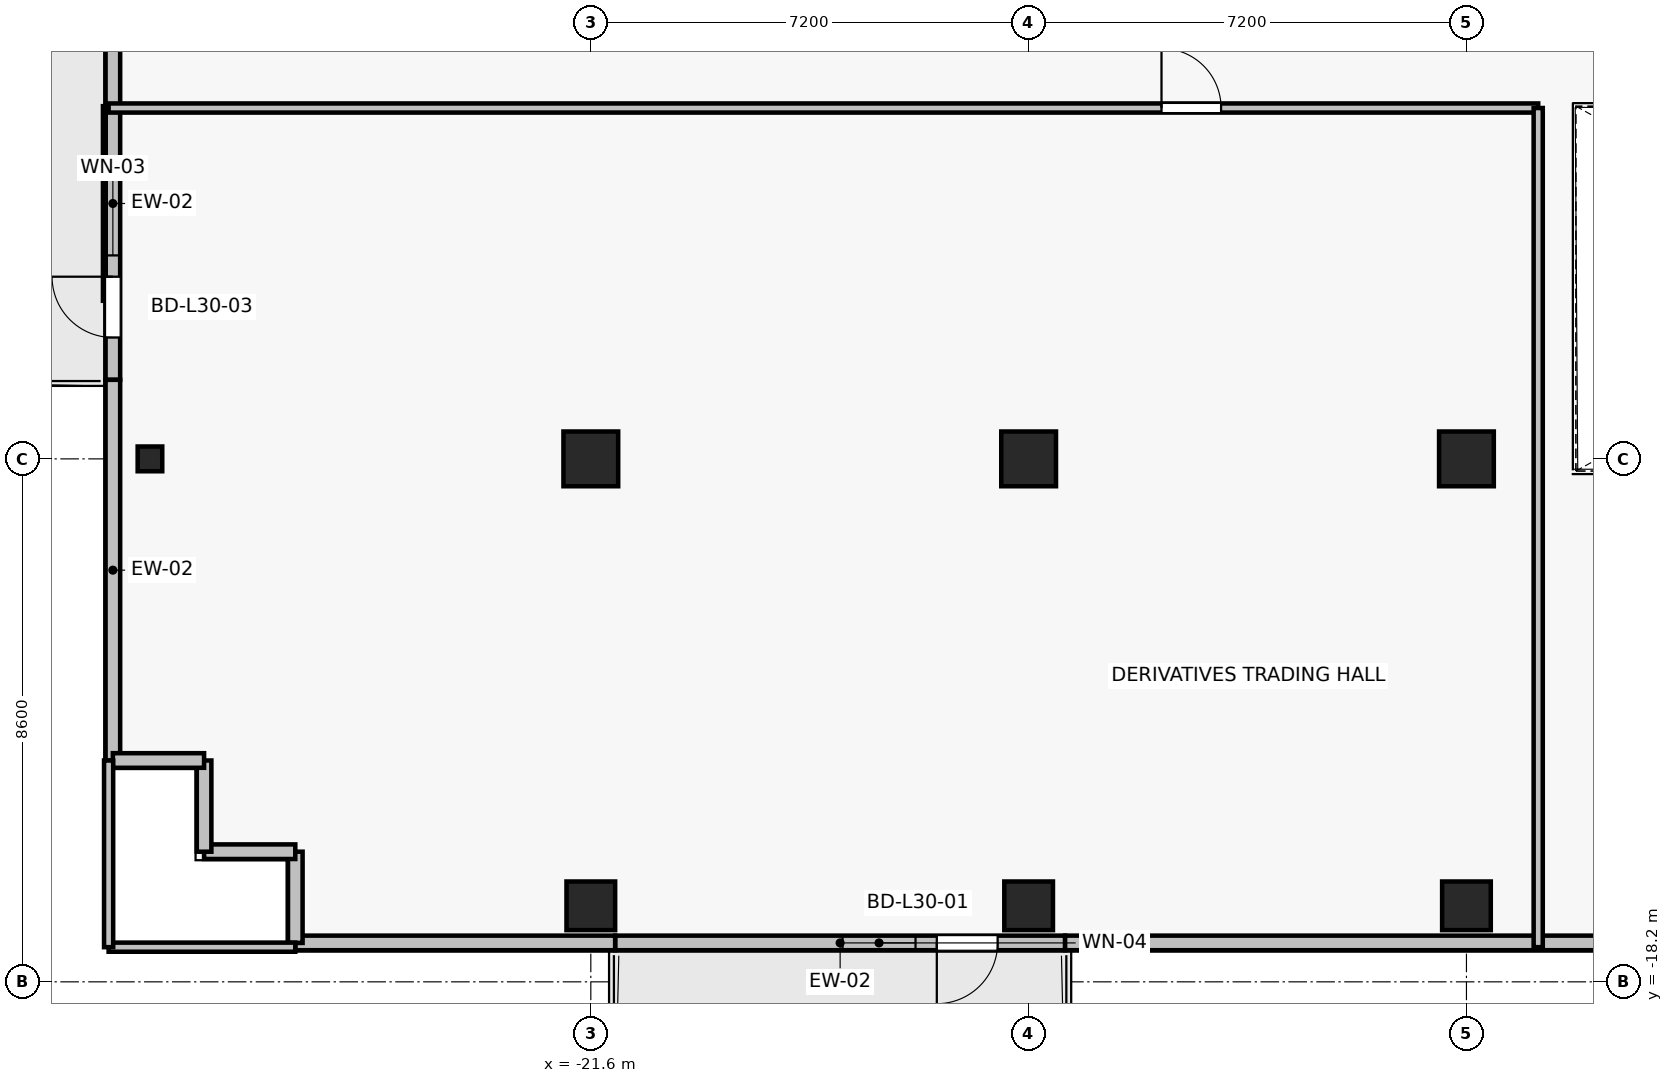
"""IFC4 building model, lengths in metres.
Left out: names, types, materials, properties, quantities, classifications, styles, units other than length and angle.
Written with IfcOpenShell. Run it as: python <this file> out.ifc"""

import sys

from ifc_helpers import new_model, si_unit, direction, frame, frame_2d, origin, origin_2d, place, context, subcontext, project, spatial, rectangle, i_section, extrude, source, transform, mapped, element, fill, save


model = new_model("IFC4")
c1 = context("Model", 3, precision=1e-05, world=origin(), true_north=direction((0.0, 1.0)))
c2 = subcontext(c1, "Body", "Model", "MODEL_VIEW")
j1 = project(units=[si_unit("LENGTHUNIT", "METRE"), si_unit("PLANEANGLEUNIT", "RADIAN")], contexts=[c1])
p1 = place(None, origin())
s1 = spatial("IfcSite", under=j1, at=p1, CompositionType="ELEMENT")
p2 = place(p1, origin())
s2 = spatial("IfcBuilding", under=s1, at=p2, CompositionType="ELEMENT")
p3 = place(p2, frame((0.0, 0.0, 109.9)))
s3 = spatial("IfcBuildingStorey", under=s2, at=p3, CompositionType="ELEMENT", Elevation=109.9)
for number, where, z_axis, x_axis in (
    (1, (-14.4, -9.6, 0.0), (0.0, 0.0, 1.0), (1.0, 0.0, 0.0)),
    (2, (-7.2, -9.6, 0.0), (0.0, 0.0, 1.0), (1.0, 0.0, 0.0)),
    (3, (-21.6, -9.6, 0.0), (0.0, 0.0, 1.0), (1.0, 0.0, 0.0)),
):
    element("IfcColumn", number, at=place(p3, frame(where, z_axis=z_axis, x_axis=x_axis)), inside=s3, PredefinedType="COLUMN", context=c2, shape_type="SweptSolid", body=[
        extrude(rectangle(XDim=0.9, YDim=0.9, at=origin_2d()), origin(), (0.0, 0.0, 1.0), 3.3),
    ])
for number, where, z_axis, x_axis in (
    (4, (-14.4, -16.95, 0.0), (0.0, 0.0, 1.0), (1.0, 0.0, 0.0)),
    (5, (-7.2, -16.95, 0.0), (0.0, 0.0, 1.0), (1.0, 0.0, 0.0)),
    (6, (-21.6, -16.95, 0.0), (0.0, 0.0, 1.0), (1.0, 0.0, 0.0)),
):
    element("IfcColumn", number, at=place(p3, frame(where, z_axis=z_axis, x_axis=x_axis)), inside=s3, PredefinedType="COLUMN", context=c2, shape_type="SweptSolid", body=[
        extrude(rectangle(XDim=0.8, YDim=0.8, at=origin_2d()), origin(), (0.0, 0.0, 1.0), 3.3),
    ])
p4 = place(p3, frame((-28.85, -9.6, 0.0), z_axis=(0.0, 0.0, 1.0), x_axis=(1.0, 0.0, 0.0)))
e7 = element("IfcColumn", 7, at=p4, inside=s3, PredefinedType="COLUMN", context=c2, shape_type="SweptSolid", body=[
    extrude(i_section(OverallWidth=0.404, OverallDepth=0.407, WebThickness=0.022, FlangeThickness=0.032, FilletRadius=0.015, at=origin_2d()), origin(), (0.0, 0.0, 1.0), 3.3),
])
p5 = place(p3, frame((-13.8, -17.56, 0.0), z_axis=(0.0, 0.0, 1.0), x_axis=(-1.0, 0.0, 0.0)))
e8 = element("IfcWall", 8, at=p5, inside=s3, PredefinedType="SOLIDWALL", context=c2, shape_type="SweptSolid", body=[
    extrude(rectangle(XDim=7.4, YDim=0.24, at=frame_2d((3.7, 0.0))), origin(), (0.0, 0.0, 1.0), 2.665),
])
p6 = place(p5, frame((1.11, 0.0, 0.0)))
e9 = element("IfcOpeningElement", 9, at=p6, cuts=e8, PredefinedType="OPENING", context=c2, shape_type="SweptSolid", body=[
    extrude(rectangle(XDim=1.0, YDim=2.2, at=frame_2d((0.5, 1.1))), frame((0.0, 0.13, 0.0), z_axis=(0.0, -1.0, 0.0), x_axis=(1.0, 0.0, 0.0)), (0.0, 0.0, 1.0), 0.26),
])
p7 = place(p5, frame((2.46, 0.0, 0.85)))
e10 = element("IfcOpeningElement", 10, at=p7, cuts=e8, PredefinedType="OPENING", context=c2, shape_type="SweptSolid", body=[
    extrude(rectangle(XDim=1.2, YDim=1.5, at=frame_2d((0.6, 0.75))), frame((0.0, 0.13, 0.0), z_axis=(0.0, -1.0, 0.0), x_axis=(1.0, 0.0, 0.0)), (0.0, 0.0, 1.0), 0.26),
])
p8 = place(p3, frame((-29.46, -8.3, 0.0), z_axis=(0.0, 0.0, 1.0), x_axis=(0.0, 1.0, 0.0)))
e11 = element("IfcWall", 11, at=p8, inside=s3, PredefinedType="SOLIDWALL", context=c2, shape_type="SweptSolid", body=[
    extrude(rectangle(XDim=5.8, YDim=0.24, at=frame_2d((2.9, 0.0))), origin(), (0.0, 0.0, 1.0), 3.075),
])
p9 = place(p8, frame((0.696, 0.0, 0.0)))
e12 = element("IfcOpeningElement", 12, at=p9, cuts=e11, PredefinedType="OPENING", context=c2, shape_type="SweptSolid", body=[
    extrude(rectangle(XDim=1.0, YDim=2.2, at=frame_2d((0.5, 1.1))), frame((0.0, 0.13, 0.0), z_axis=(0.0, -1.0, 0.0), x_axis=(1.0, 0.0, 0.0)), (0.0, 0.0, 1.0), 0.26),
])
p10 = place(p8, frame((2.046, 0.0, 0.85)))
e13 = element("IfcOpeningElement", 13, at=p10, cuts=e11, PredefinedType="OPENING", context=c2, shape_type="SweptSolid", body=[
    extrude(rectangle(XDim=1.5, YDim=1.6, at=frame_2d((0.75, 0.8))), frame((0.0, 0.13, 0.0), z_axis=(0.0, -1.0, 0.0), x_axis=(1.0, 0.0, 0.0)), (0.0, 0.0, 1.0), 0.26),
])
p11 = place(p3, frame((-29.46, -8.3, 0.0), z_axis=(0.0, 0.0, 1.0), x_axis=(0.0, -1.0, 0.0)))
e14 = element("IfcWall", 14, at=p11, inside=s3, PredefinedType="SOLIDWALL", context=c2, shape_type="SweptSolid", body=[
    extrude(rectangle(XDim=6.26, YDim=0.24, at=frame_2d((3.13, 0.0))), origin(), (0.0, 0.0, 1.0), 3.075),
])
p12 = place(p3, frame((-13.8, -17.56, 0.0), z_axis=(0.0, 0.0, 1.0), x_axis=(1.0, 0.0, 0.0)))
e15 = element("IfcWall", 15, at=p12, inside=s3, PredefinedType="SOLIDWALL", context=c2, shape_type="SweptSolid", body=[
    extrude(rectangle(XDim=10.46, YDim=0.24, at=frame_2d((5.23, 0.0))), origin(), (0.0, 0.0, 1.0), 2.665),
])
p13 = place(p3, frame((-26.46, -17.56, 0.0), z_axis=(0.0, 0.0, 1.0), x_axis=(1.0, 0.0, 0.0)))
e16 = element("IfcWall", 16, at=p13, inside=s3, PredefinedType="SOLIDWALL", context=c2, shape_type="SweptSolid", body=[
    extrude(rectangle(XDim=5.26, YDim=0.24, at=frame_2d((2.63, 0.0))), origin(), (0.0, 0.0, 1.0), 3.075),
])
for number, where, z_axis, x_axis in (
    (17, (-26.46, -16.06, 0.0), (0.0, 0.0, 1.0), (0.0, -1.0, 0.0)),
    (18, (-27.96, -16.06, 0.0), (0.0, 0.0, 1.0), (1.0, 0.0, 0.0)),
    (19, (-27.96, -14.56, 0.0), (0.0, 0.0, 1.0), (0.0, -1.0, 0.0)),
    (20, (-29.46, -14.56, 0.0), (0.0, 0.0, 1.0), (1.0, 0.0, 0.0)),
):
    element("IfcWall", number, at=place(p3, frame(where, z_axis=z_axis, x_axis=x_axis)), inside=s3, PredefinedType="SOLIDWALL", context=c2, shape_type="SweptSolid", body=[
        extrude(rectangle(XDim=1.5, YDim=0.24, at=frame_2d((0.75, 0.0))), origin(), (0.0, 0.0, 1.0), 3.075),
    ])
p14 = place(p3, frame((-26.46, -17.63, 0.0), z_axis=(0.0, 0.0, 1.0), x_axis=(-1.0, 0.0, 0.0)))
e21 = element("IfcWall", 21, at=p14, inside=s3, PredefinedType="PARTITIONING", context=c2, shape_type="SweptSolid", body=[
    extrude(rectangle(XDim=3.07, YDim=0.15, at=frame_2d((1.535, 0.0))), origin(), (0.0, 0.0, 1.0), 2.665),
])
p15 = place(p3, frame((-29.53, -3.83, 0.0), z_axis=(0.0, 0.0, 1.0), x_axis=(1.0, 0.0, 0.0)))
e22 = element("IfcWall", 22, at=p15, inside=s3, PredefinedType="PARTITIONING", context=c2, shape_type="SweptSolid", body=[
    extrude(rectangle(XDim=23.51, YDim=0.15, at=frame_2d((11.755, 0.0))), origin(), (0.0, 0.0, 1.0), 2.515),
])
p16 = place(p15, frame((17.315, 0.0, 0.0)))
e23 = element("IfcOpeningElement", 23, at=p16, cuts=e22, PredefinedType="OPENING", context=c2, shape_type="SweptSolid", body=[
    extrude(rectangle(XDim=0.98, YDim=2.15, at=frame_2d((0.49, 1.075))), frame((0.0, 0.085, 0.0), z_axis=(0.0, -1.0, 0.0), x_axis=(1.0, 0.0, 0.0)), (0.0, 0.0, 1.0), 0.17),
])
p17 = place(p3, frame((-29.53, -17.63, 0.0), z_axis=(0.0, 0.0, 1.0), x_axis=(0.0, 1.0, 0.0)))
e24 = element("IfcWall", 24, at=p17, inside=s3, PredefinedType="PARTITIONING", context=c2, shape_type="SweptSolid", body=[
    extrude(rectangle(XDim=3.07, YDim=0.15, at=frame_2d((1.535, 0.0))), origin(), (0.0, 0.0, 1.0), 3.075),
])
p18 = place(p3, frame((-6.02, -3.83, 0.0), z_axis=(0.0, 0.0, 1.0), x_axis=(0.0, -1.0, 0.0)))
e25 = element("IfcWall", 25, at=p18, inside=s3, PredefinedType="PARTITIONING", context=c2, shape_type="SweptSolid", body=[
    extrude(rectangle(XDim=13.8, YDim=0.15, at=frame_2d((6.9, 0.0))), origin(), (0.0, 0.0, 1.0), 2.515),
])
m1 = source(origin(), c2, "Body", "SweptSolid", [
    extrude(rectangle(XDim=1.0, YDim=2.2, at=frame_2d((0.5, 1.1))), frame((0.0, 0.025, 0.0), z_axis=(0.0, -1.0, 0.0), x_axis=(1.0, 0.0, 0.0)), (0.0, 0.0, 1.0), 0.05),
])
p19 = place(p6, origin())
e26 = element("IfcDoor", 26, at=p19, inside=s3, OperationType="SINGLE_SWING_RIGHT", PredefinedType="DOOR", context=c2, shape_type="MappedRepresentation", body=[
    mapped(m1, transform((0.0, 0.0, 0.0), x_axis=(1.0, 0.0, 0.0), y_axis=(0.0, 1.0, 0.0), z_axis=(0.0, 0.0, 1.0), scale=1.0)),
])
fill(e9, e26)
m2 = source(origin(), c2, "Body", "SweptSolid", [
    extrude(rectangle(XDim=1.2, YDim=1.5, at=frame_2d((0.6, 0.75))), frame((0.0, 0.03, 0.0), z_axis=(0.0, -1.0, 0.0), x_axis=(1.0, 0.0, 0.0)), (0.0, 0.0, 1.0), 0.06),
])
p20 = place(p7, origin())
e27 = element("IfcWindow", 27, at=p20, inside=s3, PartitioningType="SINGLE_PANEL", PredefinedType="WINDOW", context=c2, shape_type="MappedRepresentation", body=[
    mapped(m2, transform((0.0, 0.0, 0.0), x_axis=(1.0, 0.0, 0.0), y_axis=(0.0, 1.0, 0.0), z_axis=(0.0, 0.0, 1.0), scale=1.0)),
])
fill(e10, e27)
p21 = place(p9, origin())
e28 = element("IfcDoor", 28, at=p21, inside=s3, OperationType="SINGLE_SWING_RIGHT", PredefinedType="DOOR", context=c2, shape_type="MappedRepresentation", body=[
    mapped(m1, transform((0.0, 0.0, 0.0), x_axis=(1.0, 0.0, 0.0), y_axis=(0.0, 1.0, 0.0), z_axis=(0.0, 0.0, 1.0), scale=1.0)),
])
fill(e12, e28)
m3 = source(origin(), c2, "Body", "SweptSolid", [
    extrude(rectangle(XDim=1.5, YDim=1.6, at=frame_2d((0.75, 0.8))), frame((0.0, 0.03, 0.0), z_axis=(0.0, -1.0, 0.0), x_axis=(1.0, 0.0, 0.0)), (0.0, 0.0, 1.0), 0.06),
])
p22 = place(p10, origin())
e29 = element("IfcWindow", 29, at=p22, inside=s3, PartitioningType="SINGLE_PANEL", PredefinedType="WINDOW", context=c2, shape_type="MappedRepresentation", body=[
    mapped(m3, transform((0.0, 0.0, 0.0), x_axis=(1.0, 0.0, 0.0), y_axis=(0.0, 1.0, 0.0), z_axis=(0.0, 0.0, 1.0), scale=1.0)),
])
fill(e13, e29)
m4 = source(origin(), c2, "Body", "SweptSolid", [
    extrude(rectangle(XDim=0.98, YDim=2.15, at=frame_2d((0.49, 1.075))), frame((0.0, 0.025, 0.0), z_axis=(0.0, -1.0, 0.0), x_axis=(1.0, 0.0, 0.0)), (0.0, 0.0, 1.0), 0.05),
])
p23 = place(p16, origin())
e30 = element("IfcDoor", 30, at=p23, inside=s3, OperationType="SINGLE_SWING_LEFT", PredefinedType="DOOR", context=c2, shape_type="MappedRepresentation", body=[
    mapped(m4, transform((0.0, 0.0, 0.0), x_axis=(1.0, 0.0, 0.0), y_axis=(0.0, 1.0, 0.0), z_axis=(0.0, 0.0, 1.0), scale=1.0)),
])
fill(e23, e30)
save(model, sys.argv[1])
